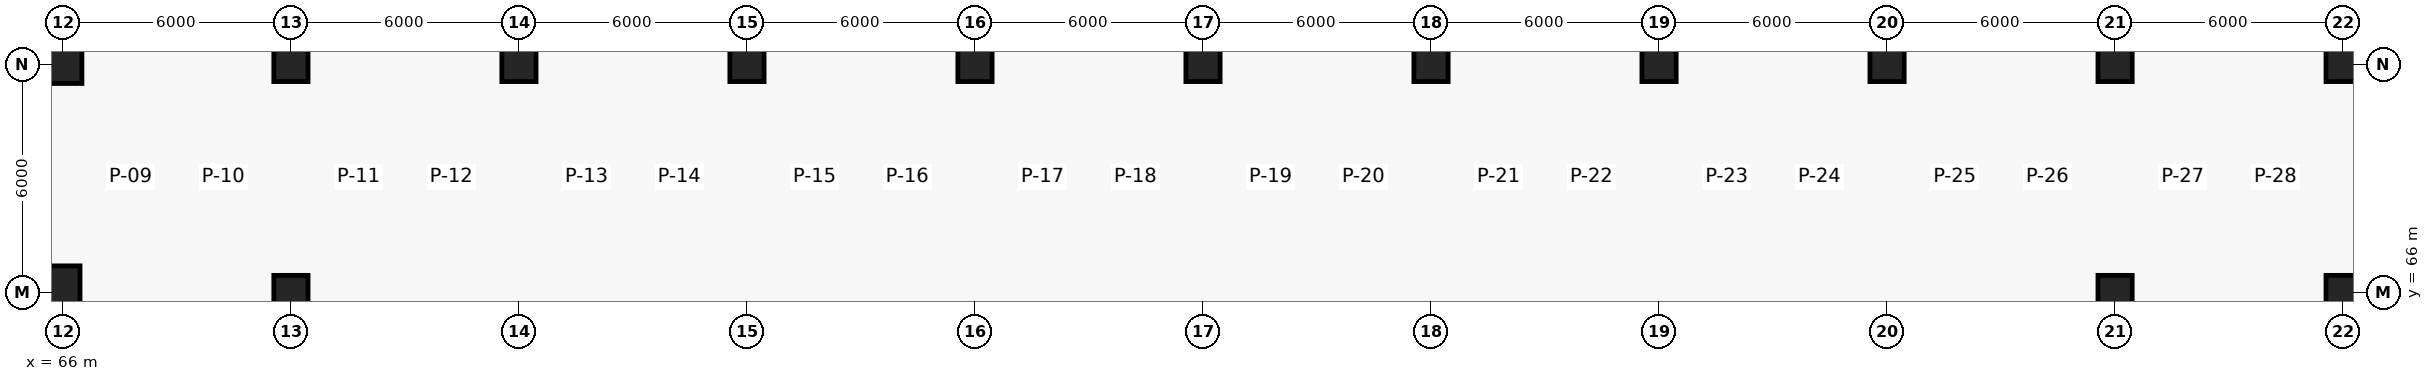
"""IFC4 building model, lengths in metres.
Left out: names, types, materials, properties, quantities, classifications, styles, units other than length and angle.
Written with IfcOpenShell. Run it as: python <this file> out.ifc"""

import sys

from ifc_helpers import new_model, si_unit, direction, frame, origin, origin_2d, place, context, subcontext, project, spatial, rectangle, extrude, element, save


model = new_model("IFC4")
c1 = context("Model", 3, precision=1e-05, world=origin(), true_north=direction((0.0, 1.0)))
c2 = subcontext(c1, "Body", "Model", "MODEL_VIEW")
j1 = project(units=[si_unit("LENGTHUNIT", "METRE"), si_unit("PLANEANGLEUNIT", "RADIAN")], contexts=[c1])
p1 = place(None, origin())
s1 = spatial("IfcSite", under=j1, at=p1, CompositionType="ELEMENT")
p2 = place(p1, origin())
s2 = spatial("IfcBuilding", under=s1, at=p2, CompositionType="ELEMENT")
p3 = place(p2, frame((0.0, 0.0, -4.8)))
s3 = spatial("IfcBuildingStorey", under=s2, at=p3, CompositionType="ELEMENT", Elevation=-4.8)
p4 = place(p3, frame((66.0, 66.0, 0.0), z_axis=(0.0, 0.0, 1.0), x_axis=(1.0, 0.0, 0.0)))
e1 = element("IfcColumn", 1, at=p4, inside=s3, PredefinedType="COLUMN", context=c2, shape_type="SweptSolid", body=[
    extrude(rectangle(XDim=0.9, YDim=1.4, at=origin_2d()), origin(), (0.0, 0.0, 1.0), 4.8),
])
p5 = place(p3, frame((66.0, 72.0, 0.0), z_axis=(0.0, 0.0, 1.0), x_axis=(1.0, 0.0, 0.0)))
e2 = element("IfcColumn", 2, at=p5, inside=s3, PredefinedType="COLUMN", context=c2, shape_type="SweptSolid", body=[
    extrude(rectangle(XDim=1.0, YDim=1.0, at=origin_2d()), origin(), (0.0, 0.0, 1.0), 4.8),
])
for number, where, z_axis, x_axis in (
    (3, (72.0, 66.0, 0.0), (0.0, 0.0, 1.0), (1.0, 0.0, 0.0)),
    (4, (72.0, 72.0, 0.0), (0.0, 0.0, 1.0), (1.0, 0.0, 0.0)),
    (5, (78.0, 72.0, 0.0), (0.0, 0.0, 1.0), (1.0, 0.0, 0.0)),
    (6, (84.0, 72.0, 0.0), (0.0, 0.0, 1.0), (1.0, 0.0, 0.0)),
    (7, (90.0, 72.0, 0.0), (0.0, 0.0, 1.0), (1.0, 0.0, 0.0)),
    (8, (96.0, 72.0, 0.0), (0.0, 0.0, 1.0), (1.0, 0.0, 0.0)),
    (9, (102.0, 72.0, 0.0), (0.0, 0.0, 1.0), (1.0, 0.0, 0.0)),
    (10, (108.0, 72.0, 0.0), (0.0, 0.0, 1.0), (1.0, 0.0, 0.0)),
    (11, (114.0, 72.0, 0.0), (0.0, 0.0, 1.0), (1.0, 0.0, 0.0)),
    (12, (120.0, 66.0, 0.0), (0.0, 0.0, 1.0), (1.0, 0.0, 0.0)),
    (13, (120.0, 72.0, 0.0), (0.0, 0.0, 1.0), (1.0, 0.0, 0.0)),
    (14, (126.0, 66.0, 0.0), (0.0, 0.0, 1.0), (1.0, 0.0, 0.0)),
    (15, (126.0, 72.0, 0.0), (0.0, 0.0, 1.0), (1.0, 0.0, 0.0)),
):
    element("IfcColumn", number, at=place(p3, frame(where, z_axis=z_axis, x_axis=x_axis)), inside=s3, PredefinedType="COLUMN", context=c2, shape_type="SweptSolid", body=[
        extrude(rectangle(XDim=0.9, YDim=0.9, at=origin_2d()), origin(), (0.0, 0.0, 1.0), 4.8),
    ])
save(model, sys.argv[1])
